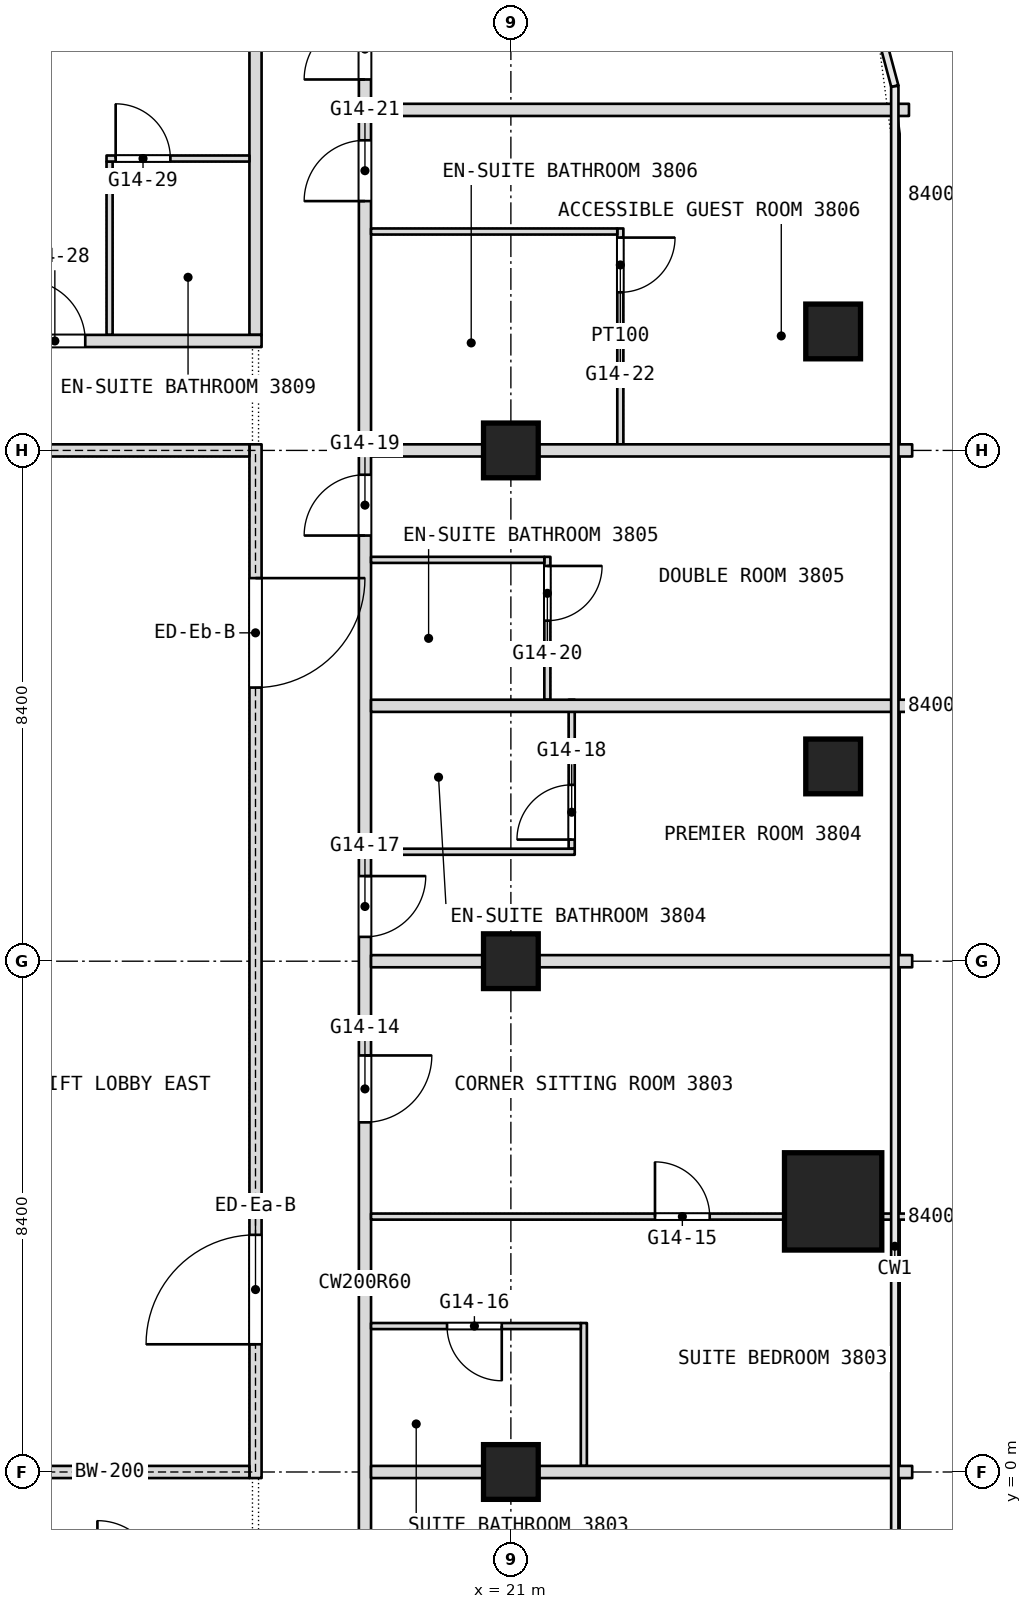
"""IFC4 building model, lengths in metres.
Left out: names, types, materials, properties, quantities, classifications, styles, units other than length and angle.
Written with IfcOpenShell. Run it as: python <this file> out.ifc"""

import sys

from ifc_helpers import new_model, si_unit, direction, frame, frame_2d, origin, origin_2d, place, context, subcontext, project, spatial, rectangle, extrude, element, fill, save


model = new_model("IFC4")
c1 = context("Model", 3, precision=1e-05, world=origin(), true_north=direction((0.0, 1.0)))
c2 = subcontext(c1, "Body", "Model", "MODEL_VIEW")
j1 = project(units=[si_unit("LENGTHUNIT", "METRE"), si_unit("PLANEANGLEUNIT", "RADIAN")], contexts=[c1])
p1 = place(None, origin())
s1 = spatial("IfcSite", under=j1, at=p1, CompositionType="ELEMENT")
p2 = place(p1, origin())
s2 = spatial("IfcBuilding", under=s1, at=p2, CompositionType="ELEMENT")
p3 = place(p2, frame((0.0, 0.0, 162.5)))
s3 = spatial("IfcBuildingStorey", under=s2, at=p3, CompositionType="ELEMENT", Elevation=162.5)
p4 = place(p3, frame((26.3, 4.45, 0.0), z_axis=(0.0, 0.0, 1.0), x_axis=(1.0, 0.0, 0.0)))
e1 = element("IfcColumn", 1, at=p4, inside=s3, PredefinedType="COLUMN", context=c2, shape_type="SweptSolid", body=[
    extrude(rectangle(XDim=1.6, YDim=1.6, at=origin_2d()), origin(), (0.0, 0.0, 1.0), 3.6),
])
for number, where, z_axis, x_axis in (
    (2, (21.0, 0.0, 0.0), (0.0, 0.0, 1.0), (1.0, 0.0, 0.0)),
    (3, (21.0, 8.4, 0.0), (0.0, 0.0, 1.0), (1.0, 0.0, 0.0)),
    (4, (21.0, 16.8, 0.0), (0.0, 0.0, 1.0), (1.0, 0.0, 0.0)),
    (5, (26.3, 18.756, 0.0), (0.0, 0.0, 1.0), (1.0, 0.0, 0.0)),
    (6, (26.3, 11.603, 0.0), (0.0, 0.0, 1.0), (1.0, 0.0, 0.0)),
):
    element("IfcColumn", number, at=place(p3, frame(where, z_axis=z_axis, x_axis=x_axis)), inside=s3, PredefinedType="COLUMN", context=c2, shape_type="SweptSolid", body=[
        extrude(rectangle(XDim=0.9, YDim=0.9, at=origin_2d()), origin(), (0.0, 0.0, 1.0), 3.6),
    ])
p5 = place(p3, frame((22.8, 16.9, 0.0), z_axis=(0.0, 0.0, 1.0), x_axis=(0.0, 1.0, 0.0)))
e7 = element("IfcWall", 7, at=p5, inside=s3, PredefinedType="PARTITIONING", context=c2, shape_type="SweptSolid", body=[
    extrude(rectangle(XDim=3.55, YDim=0.1, at=frame_2d((1.775, 0.0))), origin(), (0.0, 0.0, 1.0), 3.34),
])
p6 = place(p5, frame((2.5, 0.0, 0.0)))
e8 = element("IfcOpeningElement", 8, at=p6, cuts=e7, PredefinedType="OPENING", context=c2, shape_type="SweptSolid", body=[
    extrude(rectangle(XDim=0.9, YDim=2.1, at=frame_2d((0.45, 1.05))), frame((0.0, 0.05, 0.0), z_axis=(0.0, -1.0, 0.0), x_axis=(1.0, 0.0, 0.0)), (0.0, 0.0, 1.0), 0.1),
])
p7 = place(p3, frame((22.2, 0.1, 0.0), z_axis=(0.0, 0.0, 1.0), x_axis=(0.0, 1.0, 0.0)))
e9 = element("IfcWall", 9, at=p7, inside=s3, PredefinedType="PARTITIONING", context=c2, shape_type="SweptSolid", body=[
    extrude(rectangle(XDim=2.35, YDim=0.1, at=frame_2d((1.175, 0.0))), origin(), (0.0, 0.0, 1.0), 3.34),
])
p8 = place(p3, frame((22.0, 10.25, 0.0), z_axis=(0.0, 0.0, 1.0), x_axis=(0.0, 1.0, 0.0)))
e10 = element("IfcWall", 10, at=p8, inside=s3, PredefinedType="PARTITIONING", context=c2, shape_type="SweptSolid", body=[
    extrude(rectangle(XDim=2.45, YDim=0.1, at=frame_2d((1.225, 0.0))), origin(), (0.0, 0.0, 1.0), 3.34),
])
p9 = place(p8, frame((0.15, 0.0, 0.0)))
e11 = element("IfcOpeningElement", 11, at=p9, cuts=e10, PredefinedType="OPENING", context=c2, shape_type="SweptSolid", body=[
    extrude(rectangle(XDim=0.9, YDim=2.1, at=frame_2d((0.45, 1.05))), frame((0.0, 0.05, 0.0), z_axis=(0.0, -1.0, 0.0), x_axis=(1.0, 0.0, 0.0)), (0.0, 0.0, 1.0), 0.1),
])
p10 = place(p3, frame((21.6, 12.7, 0.0), z_axis=(0.0, 0.0, 1.0), x_axis=(0.0, 1.0, 0.0)))
e12 = element("IfcWall", 12, at=p10, inside=s3, PredefinedType="PARTITIONING", context=c2, shape_type="SweptSolid", body=[
    extrude(rectangle(XDim=2.35, YDim=0.1, at=frame_2d((1.175, 0.0))), origin(), (0.0, 0.0, 1.0), 3.34),
])
p11 = place(p10, frame((1.3, 0.0, 0.0)))
e13 = element("IfcOpeningElement", 13, at=p11, cuts=e12, PredefinedType="OPENING", context=c2, shape_type="SweptSolid", body=[
    extrude(rectangle(XDim=0.9, YDim=2.1, at=frame_2d((0.45, 1.05))), frame((0.0, 0.05, 0.0), z_axis=(0.0, -1.0, 0.0), x_axis=(1.0, 0.0, 0.0)), (0.0, 0.0, 1.0), 0.1),
])
p12 = place(p3, frame((18.6, -21.708, 0.0), z_axis=(0.0, 0.0, 1.0), x_axis=(0.0, 1.0, 0.0)))
e14 = element("IfcWall", 14, at=p12, inside=s3, PredefinedType="PARTITIONING", context=c2, shape_type="SweptSolid", body=[
    extrude(rectangle(XDim=49.648, YDim=0.2, at=frame_2d((24.824, 0.0))), origin(), (0.0, 0.0, 1.0), 3.34),
])
p13 = place(p12, frame((2.204, 0.0, 0.0)))
e15 = element("IfcOpeningElement", 15, at=p13, cuts=e14, PredefinedType="OPENING", context=c2, shape_type="SweptSolid", body=[
    extrude(rectangle(XDim=0.9, YDim=2.1, at=frame_2d((0.45, 1.05))), frame((0.0, 0.1, 0.0), z_axis=(0.0, -1.0, 0.0), x_axis=(1.0, 0.0, 0.0)), (0.0, 0.0, 1.0), 0.2),
])
p14 = place(p12, frame((8.608, 0.0, 0.0)))
e16 = element("IfcOpeningElement", 16, at=p14, cuts=e14, PredefinedType="OPENING", context=c2, shape_type="SweptSolid", body=[
    extrude(rectangle(XDim=1.1, YDim=2.1, at=frame_2d((0.55, 1.05))), frame((0.0, 0.1, 0.0), z_axis=(0.0, -1.0, 0.0), x_axis=(1.0, 0.0, 0.0)), (0.0, 0.0, 1.0), 0.2),
])
p15 = place(p12, frame((16.608, 0.0, 0.0)))
e17 = element("IfcOpeningElement", 17, at=p15, cuts=e14, PredefinedType="OPENING", context=c2, shape_type="SweptSolid", body=[
    extrude(rectangle(XDim=1.8, YDim=2.1, at=frame_2d((0.9, 1.05))), frame((0.0, 0.1, 0.0), z_axis=(0.0, -1.0, 0.0), x_axis=(1.0, 0.0, 0.0)), (0.0, 0.0, 1.0), 0.2),
])
p16 = place(p12, frame((27.458, 0.0, 0.0)))
e18 = element("IfcOpeningElement", 18, at=p16, cuts=e14, PredefinedType="OPENING", context=c2, shape_type="SweptSolid", body=[
    extrude(rectangle(XDim=1.1, YDim=2.1, at=frame_2d((0.55, 1.05))), frame((0.0, 0.1, 0.0), z_axis=(0.0, -1.0, 0.0), x_axis=(1.0, 0.0, 0.0)), (0.0, 0.0, 1.0), 0.2),
])
p17 = place(p12, frame((30.508, 0.0, 0.0)))
e19 = element("IfcOpeningElement", 19, at=p17, cuts=e14, PredefinedType="OPENING", context=c2, shape_type="SweptSolid", body=[
    extrude(rectangle(XDim=1.0, YDim=2.1, at=frame_2d((0.5, 1.05))), frame((0.0, 0.1, 0.0), z_axis=(0.0, -1.0, 0.0), x_axis=(1.0, 0.0, 0.0)), (0.0, 0.0, 1.0), 0.2),
])
p18 = place(p12, frame((37.108, 0.0, 0.0)))
e20 = element("IfcOpeningElement", 20, at=p18, cuts=e14, PredefinedType="OPENING", context=c2, shape_type="SweptSolid", body=[
    extrude(rectangle(XDim=1.0, YDim=2.1, at=frame_2d((0.5, 1.05))), frame((0.0, 0.1, 0.0), z_axis=(0.0, -1.0, 0.0), x_axis=(1.0, 0.0, 0.0)), (0.0, 0.0, 1.0), 0.2),
])
p19 = place(p12, frame((42.608, 0.0, 0.0)))
e21 = element("IfcOpeningElement", 21, at=p19, cuts=e14, PredefinedType="OPENING", context=c2, shape_type="SweptSolid", body=[
    extrude(rectangle(XDim=1.0, YDim=2.1, at=frame_2d((0.5, 1.05))), frame((0.0, 0.1, 0.0), z_axis=(0.0, -1.0, 0.0), x_axis=(1.0, 0.0, 0.0)), (0.0, 0.0, 1.0), 0.2),
])
p20 = place(p12, frame((44.608, 0.0, 0.0)))
e22 = element("IfcOpeningElement", 22, at=p20, cuts=e14, PredefinedType="OPENING", context=c2, shape_type="SweptSolid", body=[
    extrude(rectangle(XDim=1.0, YDim=2.1, at=frame_2d((0.5, 1.05))), frame((0.0, 0.1, 0.0), z_axis=(0.0, -1.0, 0.0), x_axis=(1.0, 0.0, 0.0)), (0.0, 0.0, 1.0), 0.2),
])
p21 = place(p3, frame((16.8, 18.7, 0.0), z_axis=(0.0, 0.0, 1.0), x_axis=(0.0, 1.0, 0.0)))
e23 = element("IfcWall", 23, at=p21, inside=s3, PredefinedType="PARTITIONING", context=c2, shape_type="SweptSolid", body=[
    extrude(rectangle(XDim=9.24, YDim=0.2, at=frame_2d((4.62, 0.0))), origin(), (0.0, 0.0, 1.0), 3.34),
])
p22 = place(p3, frame((14.4, 18.7, 0.0), z_axis=(0.0, 0.0, 1.0), x_axis=(0.0, 1.0, 0.0)))
e24 = element("IfcWall", 24, at=p22, inside=s3, PredefinedType="PARTITIONING", context=c2, shape_type="SweptSolid", body=[
    extrude(rectangle(XDim=2.85, YDim=0.1, at=frame_2d((1.425, 0.0))), origin(), (0.0, 0.0, 1.0), 3.34),
])
p23 = place(p3, frame((18.7, 0.0, 0.0), z_axis=(0.0, 0.0, 1.0), x_axis=(1.0, 0.0, 0.0)))
e25 = element("IfcWall", 25, at=p23, inside=s3, PredefinedType="PARTITIONING", context=c2, shape_type="SweptSolid", body=[
    extrude(rectangle(XDim=8.9, YDim=0.2, at=frame_2d((4.45, 0.0))), origin(), (0.0, 0.0, 1.0), 2.89),
])
p24 = place(p3, frame((18.7, 2.4, 0.0), z_axis=(0.0, 0.0, 1.0), x_axis=(1.0, 0.0, 0.0)))
e26 = element("IfcWall", 26, at=p24, inside=s3, PredefinedType="PARTITIONING", context=c2, shape_type="SweptSolid", body=[
    extrude(rectangle(XDim=3.45, YDim=0.1, at=frame_2d((1.725, 0.0))), origin(), (0.0, 0.0, 1.0), 3.34),
])
p25 = place(p24, frame((1.25, 0.0, 0.0)))
e27 = element("IfcOpeningElement", 27, at=p25, cuts=e26, PredefinedType="OPENING", context=c2, shape_type="SweptSolid", body=[
    extrude(rectangle(XDim=0.9, YDim=2.1, at=frame_2d((0.45, 1.05))), frame((0.0, 0.05, 0.0), z_axis=(0.0, -1.0, 0.0), x_axis=(1.0, 0.0, 0.0)), (0.0, 0.0, 1.0), 0.1),
])
p26 = place(p3, frame((18.7, 4.2, 0.0), z_axis=(0.0, 0.0, 1.0), x_axis=(1.0, 0.0, 0.0)))
e28 = element("IfcWall", 28, at=p26, inside=s3, PredefinedType="PARTITIONING", context=c2, shape_type="SweptSolid", body=[
    extrude(rectangle(XDim=6.8, YDim=0.1, at=frame_2d((3.4, 0.0))), origin(), (0.0, 0.0, 1.0), 3.34),
])
p27 = place(p26, frame((4.67, 0.0, 0.0)))
e29 = element("IfcOpeningElement", 29, at=p27, cuts=e28, PredefinedType="OPENING", context=c2, shape_type="SweptSolid", body=[
    extrude(rectangle(XDim=0.9, YDim=2.1, at=frame_2d((0.45, 1.05))), frame((0.0, 0.05, 0.0), z_axis=(0.0, -1.0, 0.0), x_axis=(1.0, 0.0, 0.0)), (0.0, 0.0, 1.0), 0.1),
])
p28 = place(p3, frame((27.1, 4.2, 0.0), z_axis=(0.0, 0.0, 1.0), x_axis=(1.0, 0.0, 0.0)))
e30 = element("IfcWall", 30, at=p28, inside=s3, PredefinedType="PARTITIONING", context=c2, shape_type="SweptSolid", body=[
    extrude(rectangle(XDim=0.5, YDim=0.1, at=frame_2d((0.25, 0.0))), origin(), (0.0, 0.0, 1.0), 3.34),
])
p29 = place(p3, frame((18.7, 8.4, 0.0), z_axis=(0.0, 0.0, 1.0), x_axis=(1.0, 0.0, 0.0)))
e31 = element("IfcWall", 31, at=p29, inside=s3, PredefinedType="PARTITIONING", context=c2, shape_type="SweptSolid", body=[
    extrude(rectangle(XDim=8.9, YDim=0.2, at=frame_2d((4.45, 0.0))), origin(), (0.0, 0.0, 1.0), 2.89),
])
p30 = place(p3, frame((18.7, 10.2, 0.0), z_axis=(0.0, 0.0, 1.0), x_axis=(1.0, 0.0, 0.0)))
e32 = element("IfcWall", 32, at=p30, inside=s3, PredefinedType="PARTITIONING", context=c2, shape_type="SweptSolid", body=[
    extrude(rectangle(XDim=3.35, YDim=0.1, at=frame_2d((1.675, 0.0))), origin(), (0.0, 0.0, 1.0), 3.34),
])
p31 = place(p3, frame((18.7, 12.6, 0.0), z_axis=(0.0, 0.0, 1.0), x_axis=(1.0, 0.0, 0.0)))
e33 = element("IfcWall", 33, at=p31, inside=s3, PredefinedType="PARTITIONING", context=c2, shape_type="SweptSolid", body=[
    extrude(rectangle(XDim=8.9, YDim=0.2, at=frame_2d((4.45, 0.0))), origin(), (0.0, 0.0, 1.0), 3.34),
])
p32 = place(p3, frame((18.7, 15.0, 0.0), z_axis=(0.0, 0.0, 1.0), x_axis=(1.0, 0.0, 0.0)))
e34 = element("IfcWall", 34, at=p32, inside=s3, PredefinedType="PARTITIONING", context=c2, shape_type="SweptSolid", body=[
    extrude(rectangle(XDim=2.85, YDim=0.1, at=frame_2d((1.425, 0.0))), origin(), (0.0, 0.0, 1.0), 3.34),
])
p33 = place(p3, frame((18.7, 16.8, 0.0), z_axis=(0.0, 0.0, 1.0), x_axis=(1.0, 0.0, 0.0)))
e35 = element("IfcWall", 35, at=p33, inside=s3, PredefinedType="PARTITIONING", context=c2, shape_type="SweptSolid", body=[
    extrude(rectangle(XDim=8.9, YDim=0.2, at=frame_2d((4.45, 0.0))), origin(), (0.0, 0.0, 1.0), 2.89),
])
p34 = place(p3, frame((10.7, 18.6, 0.0), z_axis=(0.0, 0.0, 1.0), x_axis=(1.0, 0.0, 0.0)))
e36 = element("IfcWall", 36, at=p34, inside=s3, PredefinedType="PARTITIONING", context=c2, shape_type="SweptSolid", body=[
    extrude(rectangle(XDim=6.2, YDim=0.2, at=frame_2d((3.1, 0.0))), origin(), (0.0, 0.0, 1.0), 3.34),
])
p35 = place(p34, frame((2.3, 0.0, 0.0)))
e37 = element("IfcOpeningElement", 37, at=p35, cuts=e36, PredefinedType="OPENING", context=c2, shape_type="SweptSolid", body=[
    extrude(rectangle(XDim=1.0, YDim=2.1, at=frame_2d((0.5, 1.05))), frame((0.0, 0.1, 0.0), z_axis=(0.0, -1.0, 0.0), x_axis=(1.0, 0.0, 0.0)), (0.0, 0.0, 1.0), 0.2),
])
p36 = place(p3, frame((18.7, 20.4, 0.0), z_axis=(0.0, 0.0, 1.0), x_axis=(1.0, 0.0, 0.0)))
e38 = element("IfcWall", 38, at=p36, inside=s3, PredefinedType="PARTITIONING", context=c2, shape_type="SweptSolid", body=[
    extrude(rectangle(XDim=4.05, YDim=0.1, at=frame_2d((2.025, 0.0))), origin(), (0.0, 0.0, 1.0), 3.34),
])
p37 = place(p3, frame((14.35, 21.6, 0.0), z_axis=(0.0, 0.0, 1.0), x_axis=(1.0, 0.0, 0.0)))
e39 = element("IfcWall", 39, at=p37, inside=s3, PredefinedType="PARTITIONING", context=c2, shape_type="SweptSolid", body=[
    extrude(rectangle(XDim=2.35, YDim=0.1, at=frame_2d((1.175, 0.0))), origin(), (0.0, 0.0, 1.0), 3.34),
])
p38 = place(p37, frame((0.15, 0.0, 0.0)))
e40 = element("IfcOpeningElement", 40, at=p38, cuts=e39, PredefinedType="OPENING", context=c2, shape_type="SweptSolid", body=[
    extrude(rectangle(XDim=0.9, YDim=2.1, at=frame_2d((0.45, 1.05))), frame((0.0, 0.05, 0.0), z_axis=(0.0, -1.0, 0.0), x_axis=(1.0, 0.0, 0.0)), (0.0, 0.0, 1.0), 0.1),
])
p39 = place(p3, frame((18.7, 22.4, 0.0), z_axis=(0.0, 0.0, 1.0), x_axis=(1.0, 0.0, 0.0)))
e41 = element("IfcWall", 41, at=p39, inside=s3, PredefinedType="PARTITIONING", context=c2, shape_type="SweptSolid", body=[
    extrude(rectangle(XDim=8.847, YDim=0.2, at=frame_2d((4.424, 0.0))), origin(), (0.0, 0.0, 1.0), 3.34),
])
p40 = place(p3, frame((16.8, -0.1, 0.0), z_axis=(0.0, 0.0, 1.0), x_axis=(0.0, 1.0, 0.0)))
e42 = element("IfcWall", 42, at=p40, inside=s3, PredefinedType="PARTITIONING", context=c2, shape_type="SweptSolid", body=[
    extrude(rectangle(XDim=17.0, YDim=0.2, at=frame_2d((8.5, 0.0))), origin(), (0.0, 0.0, 1.0), 3.34),
])
p41 = place(p40, frame((2.2, 0.0, 0.0)))
e43 = element("IfcOpeningElement", 43, at=p41, cuts=e42, PredefinedType="OPENING", context=c2, shape_type="SweptSolid", body=[
    extrude(rectangle(XDim=1.8, YDim=2.1, at=frame_2d((0.9, 1.05))), frame((0.0, 0.1, 0.0), z_axis=(0.0, -1.0, 0.0), x_axis=(1.0, 0.0, 0.0)), (0.0, 0.0, 1.0), 0.2),
])
p42 = place(p40, frame((13.0, 0.0, 0.0)))
e44 = element("IfcOpeningElement", 44, at=p42, cuts=e42, PredefinedType="OPENING", context=c2, shape_type="SweptSolid", body=[
    extrude(rectangle(XDim=1.8, YDim=2.1, at=frame_2d((0.9, 1.05))), frame((0.0, 0.1, 0.0), z_axis=(0.0, -1.0, 0.0), x_axis=(1.0, 0.0, 0.0)), (0.0, 0.0, 1.0), 0.2),
])
for number, where, z_axis, x_axis in (
    (45, (12.1, 0.0, 0.0), (0.0, 0.0, 1.0), (1.0, 0.0, 0.0)),
    (46, (12.1, 16.8, 0.0), (0.0, 0.0, 1.0), (1.0, 0.0, 0.0)),
):
    element("IfcWall", number, at=place(p3, frame(where, z_axis=z_axis, x_axis=x_axis)), inside=s3, PredefinedType="PARTITIONING", context=c2, shape_type="SweptSolid", body=[
        extrude(rectangle(XDim=4.6, YDim=0.2, at=frame_2d((2.3, 0.0))), origin(), (0.0, 0.0, 1.0), 2.89),
    ])
p43 = place(p6, origin())
e47 = element("IfcDoor", 47, at=p43, inside=s3, OperationType="SINGLE_SWING_RIGHT", PredefinedType="DOOR", context=c2, shape_type="SweptSolid", body=[
    extrude(rectangle(XDim=0.9, YDim=2.1, at=frame_2d((0.45, 1.05))), frame((0.0, 0.025, 0.0), z_axis=(0.0, -1.0, 0.0), x_axis=(1.0, 0.0, 0.0)), (0.0, 0.0, 1.0), 0.05),
])
fill(e8, e47)
p44 = place(p9, origin())
e48 = element("IfcDoor", 48, at=p44, inside=s3, OperationType="SINGLE_SWING_LEFT", PredefinedType="DOOR", context=c2, shape_type="SweptSolid", body=[
    extrude(rectangle(XDim=0.9, YDim=2.1, at=frame_2d((0.45, 1.05))), frame((0.0, 0.025, 0.0), z_axis=(0.0, -1.0, 0.0), x_axis=(1.0, 0.0, 0.0)), (0.0, 0.0, 1.0), 0.05),
])
fill(e11, e48)
p45 = place(p11, origin())
e49 = element("IfcDoor", 49, at=p45, inside=s3, OperationType="SINGLE_SWING_RIGHT", PredefinedType="DOOR", context=c2, shape_type="SweptSolid", body=[
    extrude(rectangle(XDim=0.9, YDim=2.1, at=frame_2d((0.45, 1.05))), frame((0.0, 0.025, 0.0), z_axis=(0.0, -1.0, 0.0), x_axis=(1.0, 0.0, 0.0)), (0.0, 0.0, 1.0), 0.05),
])
fill(e13, e49)
p46 = place(p16, origin())
e50 = element("IfcDoor", 50, at=p46, inside=s3, OperationType="SINGLE_SWING_RIGHT", PredefinedType="DOOR", context=c2, shape_type="SweptSolid", body=[
    extrude(rectangle(XDim=1.1, YDim=2.1, at=frame_2d((0.55, 1.05))), frame((0.0, 0.025, 0.0), z_axis=(0.0, -1.0, 0.0), x_axis=(1.0, 0.0, 0.0)), (0.0, 0.0, 1.0), 0.05),
])
fill(e18, e50)
p47 = place(p17, origin())
e51 = element("IfcDoor", 51, at=p47, inside=s3, OperationType="SINGLE_SWING_LEFT", PredefinedType="DOOR", context=c2, shape_type="SweptSolid", body=[
    extrude(rectangle(XDim=1.0, YDim=2.1, at=frame_2d((0.5, 1.05))), frame((0.0, 0.025, 0.0), z_axis=(0.0, -1.0, 0.0), x_axis=(1.0, 0.0, 0.0)), (0.0, 0.0, 1.0), 0.05),
])
fill(e19, e51)
p48 = place(p18, origin())
e52 = element("IfcDoor", 52, at=p48, inside=s3, OperationType="SINGLE_SWING_LEFT", PredefinedType="DOOR", context=c2, shape_type="SweptSolid", body=[
    extrude(rectangle(XDim=1.0, YDim=2.1, at=frame_2d((0.5, 1.05))), frame((0.0, 0.025, 0.0), z_axis=(0.0, -1.0, 0.0), x_axis=(1.0, 0.0, 0.0)), (0.0, 0.0, 1.0), 0.05),
])
fill(e20, e52)
p49 = place(p19, origin())
e53 = element("IfcDoor", 53, at=p49, inside=s3, OperationType="SINGLE_SWING_LEFT", PredefinedType="DOOR", context=c2, shape_type="SweptSolid", body=[
    extrude(rectangle(XDim=1.0, YDim=2.1, at=frame_2d((0.5, 1.05))), frame((0.0, 0.025, 0.0), z_axis=(0.0, -1.0, 0.0), x_axis=(1.0, 0.0, 0.0)), (0.0, 0.0, 1.0), 0.05),
])
fill(e21, e53)
p50 = place(p20, origin())
e54 = element("IfcDoor", 54, at=p50, inside=s3, OperationType="SINGLE_SWING_LEFT", PredefinedType="DOOR", context=c2, shape_type="SweptSolid", body=[
    extrude(rectangle(XDim=1.0, YDim=2.1, at=frame_2d((0.5, 1.05))), frame((0.0, 0.025, 0.0), z_axis=(0.0, -1.0, 0.0), x_axis=(1.0, 0.0, 0.0)), (0.0, 0.0, 1.0), 0.05),
])
fill(e22, e54)
p51 = place(p25, origin())
e55 = element("IfcDoor", 55, at=p51, inside=s3, OperationType="SINGLE_SWING_RIGHT", PredefinedType="DOOR", context=c2, shape_type="SweptSolid", body=[
    extrude(rectangle(XDim=0.9, YDim=2.1, at=frame_2d((0.45, 1.05))), frame((0.0, 0.025, 0.0), z_axis=(0.0, -1.0, 0.0), x_axis=(1.0, 0.0, 0.0)), (0.0, 0.0, 1.0), 0.05),
])
fill(e27, e55)
p52 = place(p27, origin())
e56 = element("IfcDoor", 56, at=p52, inside=s3, OperationType="SINGLE_SWING_LEFT", PredefinedType="DOOR", context=c2, shape_type="SweptSolid", body=[
    extrude(rectangle(XDim=0.9, YDim=2.1, at=frame_2d((0.45, 1.05))), frame((0.0, 0.025, 0.0), z_axis=(0.0, -1.0, 0.0), x_axis=(1.0, 0.0, 0.0)), (0.0, 0.0, 1.0), 0.05),
])
fill(e29, e56)
p53 = place(p35, origin())
e57 = element("IfcDoor", 57, at=p53, inside=s3, OperationType="SINGLE_SWING_LEFT", PredefinedType="DOOR", context=c2, shape_type="SweptSolid", body=[
    extrude(rectangle(XDim=1.0, YDim=2.1, at=frame_2d((0.5, 1.05))), frame((0.0, 0.025, 0.0), z_axis=(0.0, -1.0, 0.0), x_axis=(1.0, 0.0, 0.0)), (0.0, 0.0, 1.0), 0.05),
])
fill(e37, e57)
p54 = place(p38, origin())
e58 = element("IfcDoor", 58, at=p54, inside=s3, OperationType="SINGLE_SWING_RIGHT", PredefinedType="DOOR", context=c2, shape_type="SweptSolid", body=[
    extrude(rectangle(XDim=0.9, YDim=2.1, at=frame_2d((0.45, 1.05))), frame((0.0, 0.025, 0.0), z_axis=(0.0, -1.0, 0.0), x_axis=(1.0, 0.0, 0.0)), (0.0, 0.0, 1.0), 0.05),
])
fill(e40, e58)
p55 = place(p41, origin())
e59 = element("IfcDoor", 59, at=p55, inside=s3, OperationType="DOUBLE_DOOR_SINGLE_SWING", PredefinedType="DOOR", context=c2, shape_type="SweptSolid", body=[
    extrude(rectangle(XDim=1.8, YDim=2.1, at=frame_2d((0.9, 1.05))), frame((0.0, 0.025, 0.0), z_axis=(0.0, -1.0, 0.0), x_axis=(1.0, 0.0, 0.0)), (0.0, 0.0, 1.0), 0.05),
])
fill(e43, e59)
p56 = place(p42, origin())
e60 = element("IfcDoor", 60, at=p56, inside=s3, OperationType="DOUBLE_DOOR_SINGLE_SWING", PredefinedType="DOOR", context=c2, shape_type="SweptSolid", body=[
    extrude(rectangle(XDim=1.8, YDim=2.1, at=frame_2d((0.9, 1.05))), frame((0.0, 0.025, 0.0), z_axis=(0.0, -1.0, 0.0), x_axis=(1.0, 0.0, 0.0)), (0.0, 0.0, 1.0), 0.05),
])
fill(e44, e60)
save(model, sys.argv[1])
